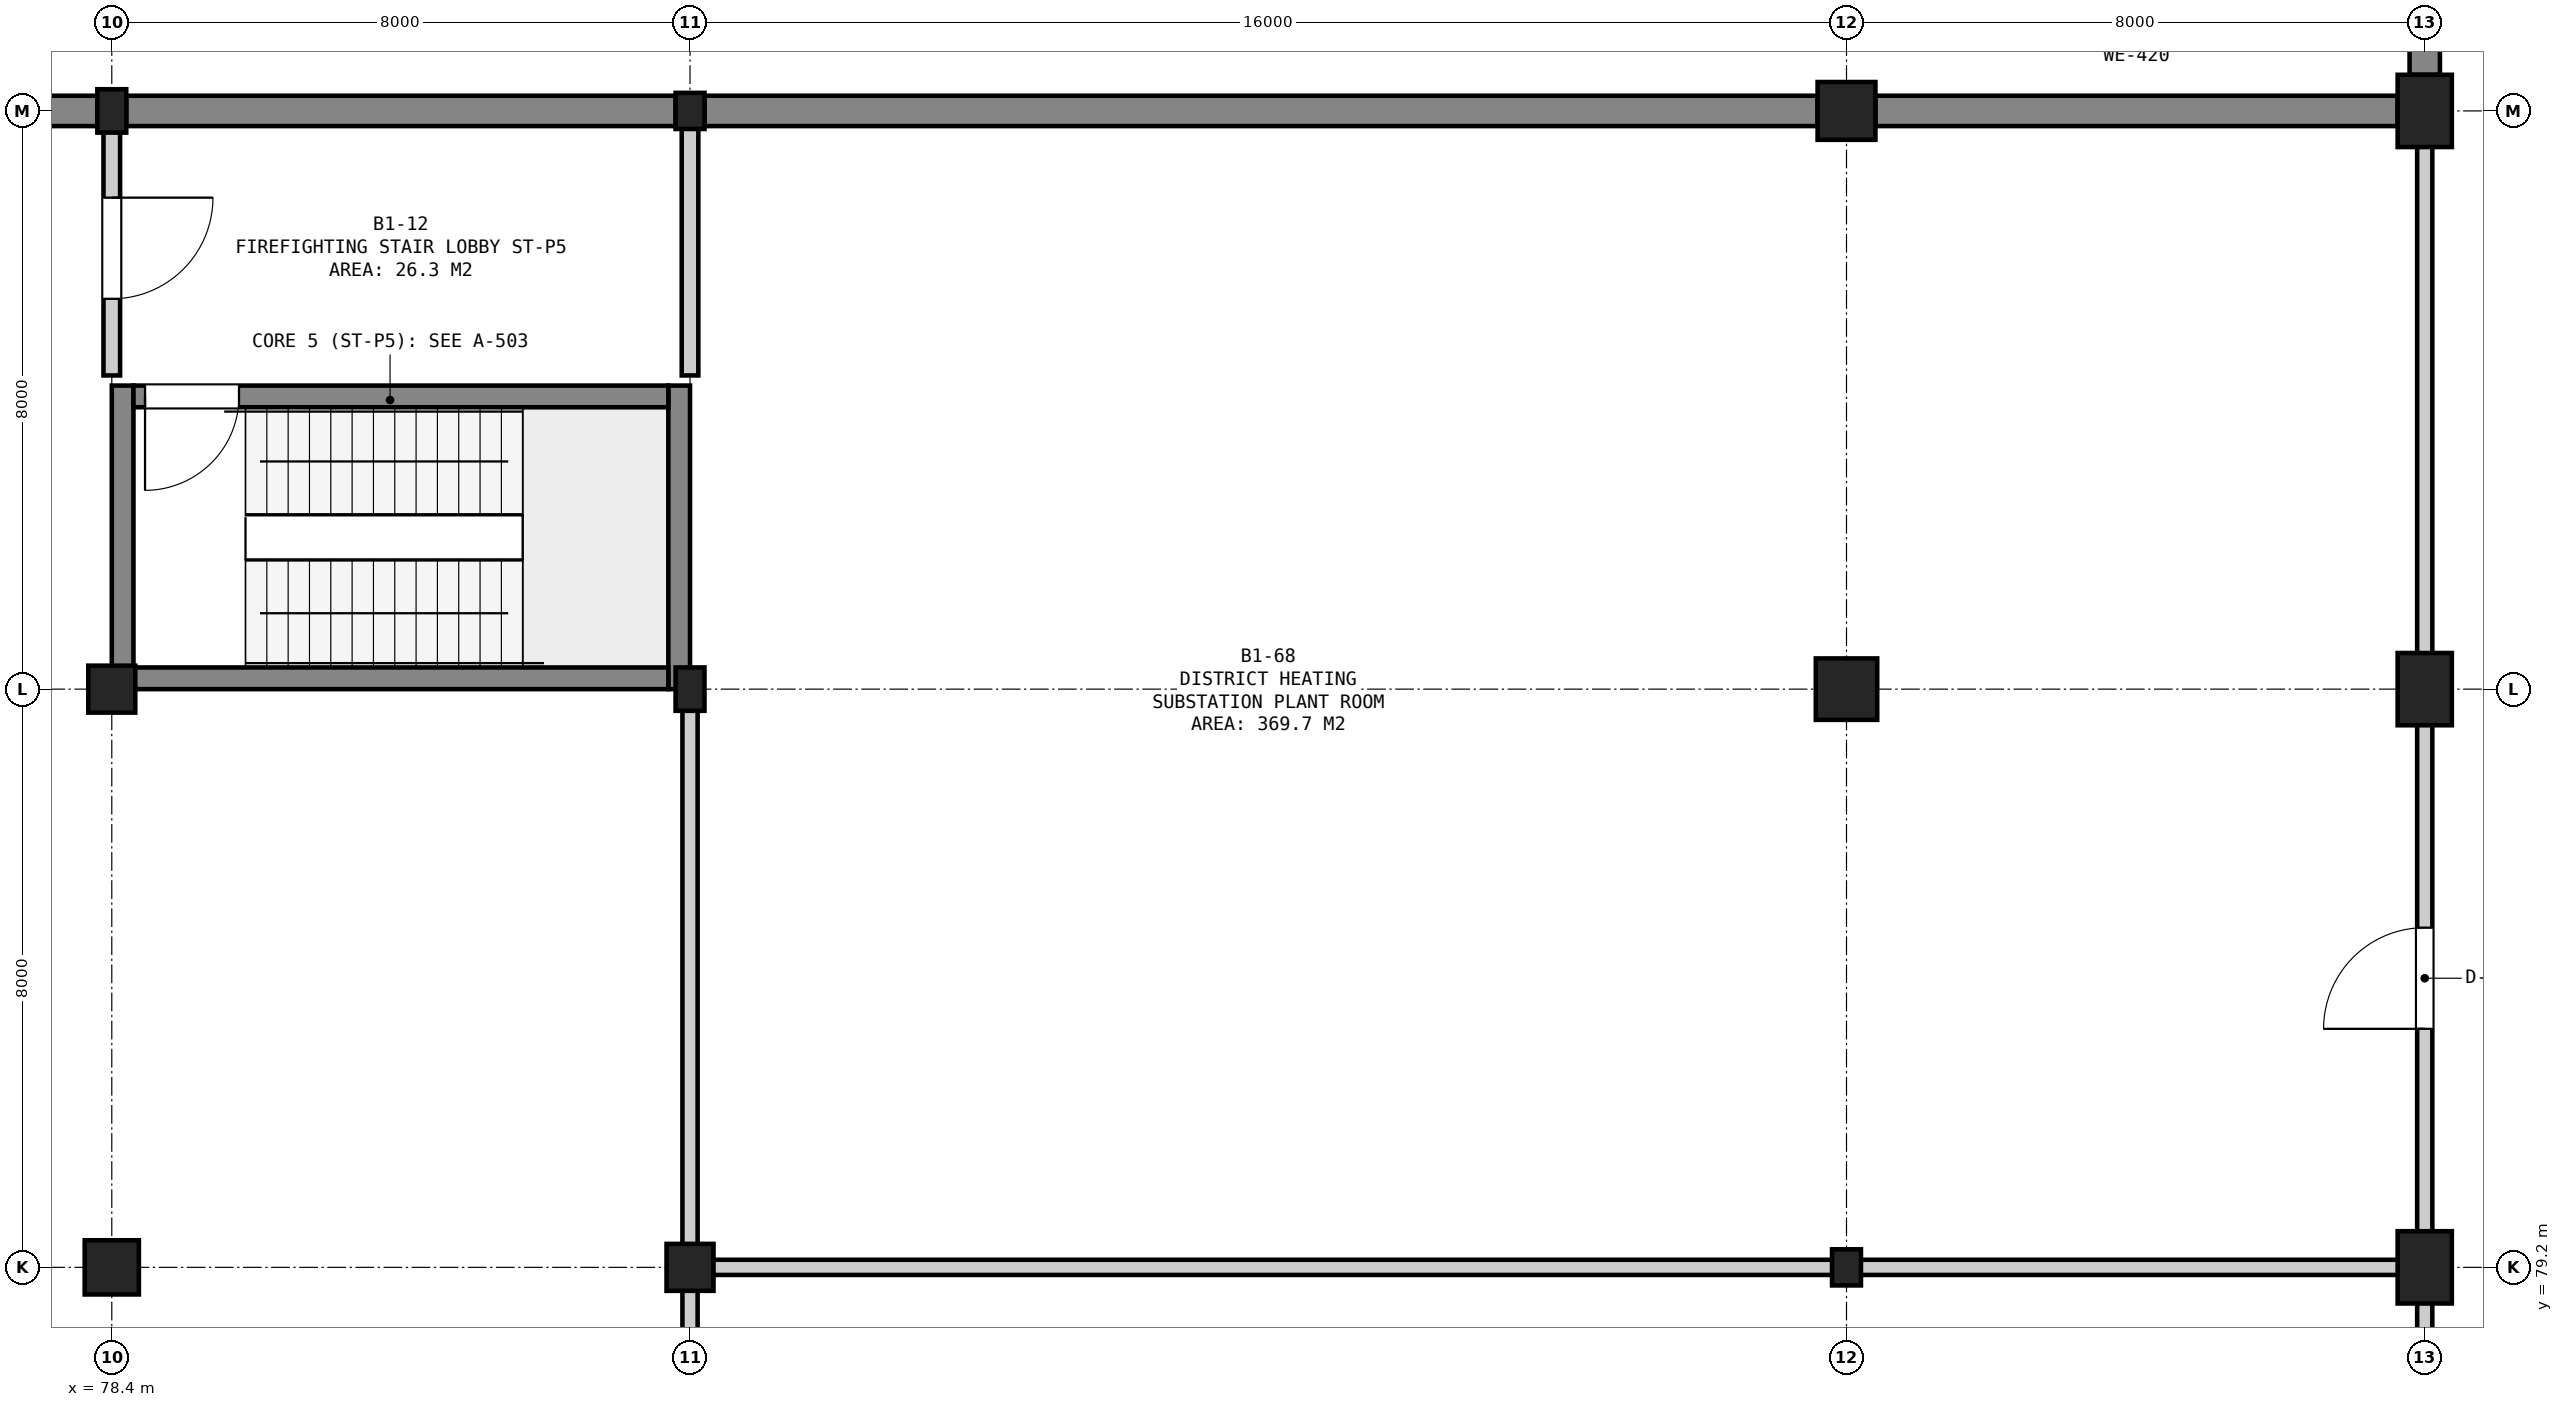
"""IFC4 building model, lengths in metres.
Left out: names, types, materials, properties, quantities, classifications, styles, units other than length and angle.
Written with IfcOpenShell. Run it as: python <this file> out.ifc"""

import sys

from ifc_helpers import new_model, si_unit, direction, frame, frame_2d, origin, origin_2d, place, context, subcontext, project, spatial, rectangle, extrude, element, fill, save


model = new_model("IFC4")
c1 = context("Model", 3, precision=1e-05, world=origin(), true_north=direction((0.0, 1.0)))
c2 = subcontext(c1, "Body", "Model", "MODEL_VIEW")
j1 = project(units=[si_unit("LENGTHUNIT", "METRE"), si_unit("PLANEANGLEUNIT", "RADIAN")], contexts=[c1])
p1 = place(None, origin())
s1 = spatial("IfcSite", under=j1, at=p1, CompositionType="ELEMENT")
p2 = place(p1, origin())
s2 = spatial("IfcBuilding", under=s1, at=p2, CompositionType="ELEMENT")
p3 = place(p2, frame((0.0, 0.0, -4.5)))
s3 = spatial("IfcBuildingStorey", under=s2, at=p3, CompositionType="ELEMENT", Elevation=-4.5)
p4 = place(p3, frame((78.4, 79.2, 0.0), z_axis=(0.0, 0.0, 1.0), x_axis=(1.0, 0.0, 0.0)))
e1 = element("IfcColumn", 1, at=p4, inside=s3, PredefinedType="COLUMN", context=c2, shape_type="SweptSolid", body=[
    extrude(rectangle(XDim=0.75, YDim=0.75, at=origin_2d()), origin(), (0.0, 0.0, 1.0), 4.5),
])
p5 = place(p3, frame((78.4, 87.2, 0.0), z_axis=(0.0, 0.0, 1.0), x_axis=(1.0, 0.0, 0.0)))
e2 = element("IfcColumn", 2, at=p5, inside=s3, PredefinedType="COLUMN", context=c2, shape_type="SweptSolid", body=[
    extrude(rectangle(XDim=0.65, YDim=0.65, at=origin_2d()), origin(), (0.0, 0.0, 1.0), 4.5),
])
p6 = place(p3, frame((78.4, 95.2, 0.0), z_axis=(0.0, 0.0, 1.0), x_axis=(1.0, 0.0, 0.0)))
e3 = element("IfcColumn", 3, at=p6, inside=s3, PredefinedType="COLUMN", context=c2, shape_type="SweptSolid", body=[
    extrude(rectangle(XDim=0.4, YDim=0.6, at=origin_2d()), origin(), (0.0, 0.0, 1.0), 4.5),
])
p7 = place(p3, frame((86.4, 79.2, 0.0), z_axis=(0.0, 0.0, 1.0), x_axis=(1.0, 0.0, 0.0)))
e4 = element("IfcColumn", 4, at=p7, inside=s3, PredefinedType="COLUMN", context=c2, shape_type="SweptSolid", body=[
    extrude(rectangle(XDim=0.65, YDim=0.65, at=origin_2d()), origin(), (0.0, 0.0, 1.0), 4.5),
])
p8 = place(p3, frame((86.4, 87.2, 0.0), z_axis=(0.0, 0.0, 1.0), x_axis=(1.0, 0.0, 0.0)))
e5 = element("IfcColumn", 5, at=p8, inside=s3, PredefinedType="COLUMN", context=c2, shape_type="SweptSolid", body=[
    extrude(rectangle(XDim=0.4, YDim=0.6, at=origin_2d()), origin(), (0.0, 0.0, 1.0), 4.5),
])
for number, where, z_axis, x_axis in (
    (6, (86.4, 95.2, 0.0), (0.0, 0.0, 1.0), (1.0, 0.0, 0.0)),
    (7, (102.4, 79.2, 0.0), (0.0, 0.0, 1.0), (1.0, 0.0, 0.0)),
):
    element("IfcColumn", number, at=place(p3, frame(where, z_axis=z_axis, x_axis=x_axis)), inside=s3, PredefinedType="COLUMN", context=c2, shape_type="SweptSolid", body=[
        extrude(rectangle(XDim=0.4, YDim=0.5, at=origin_2d()), origin(), (0.0, 0.0, 1.0), 4.5),
    ])
p9 = place(p3, frame((102.4, 87.2, 0.0), z_axis=(0.0, 0.0, 1.0), x_axis=(1.0, 0.0, 0.0)))
e8 = element("IfcColumn", 8, at=p9, inside=s3, PredefinedType="COLUMN", context=c2, shape_type="SweptSolid", body=[
    extrude(rectangle(XDim=0.85, YDim=0.85, at=origin_2d()), origin(), (0.0, 0.0, 1.0), 4.5),
])
p10 = place(p3, frame((102.4, 95.2, 0.0), z_axis=(0.0, 0.0, 1.0), x_axis=(1.0, 0.0, 0.0)))
e9 = element("IfcColumn", 9, at=p10, inside=s3, PredefinedType="COLUMN", context=c2, shape_type="SweptSolid", body=[
    extrude(rectangle(XDim=0.8, YDim=0.8, at=origin_2d()), origin(), (0.0, 0.0, 1.0), 4.5),
])
for number, where, z_axis, x_axis in (
    (10, (110.4, 79.2, 0.0), (0.0, 0.0, 1.0), (1.0, 0.0, 0.0)),
    (11, (110.4, 87.2, 0.0), (0.0, 0.0, 1.0), (1.0, 0.0, 0.0)),
    (12, (110.4, 95.2, 0.0), (0.0, 0.0, 1.0), (1.0, 0.0, 0.0)),
):
    element("IfcColumn", number, at=place(p3, frame(where, z_axis=z_axis, x_axis=x_axis)), inside=s3, PredefinedType="COLUMN", context=c2, shape_type="SweptSolid", body=[
        extrude(rectangle(XDim=0.75, YDim=1.0, at=origin_2d()), origin(), (0.0, 0.0, 1.0), 4.5),
    ])
p11 = place(p3, frame((110.4, 108.3, 0.0), z_axis=(0.0, 0.0, 1.0), x_axis=(0.0, -1.0, 0.0)))
e13 = element("IfcWall", 13, at=p11, inside=s3, PredefinedType="SOLIDWALL", context=c2, shape_type="SweptSolid", body=[
    extrude(rectangle(XDim=12.6, YDim=0.42, at=frame_2d((6.3, 0.0))), origin(), (0.0, 0.0, 1.0), 4.08),
])
p12 = place(p3, frame((110.025, 95.2, 0.0), z_axis=(0.0, 0.0, 1.0), x_axis=(-1.0, 0.0, 0.0)))
e14 = element("IfcWall", 14, at=p12, inside=s3, PredefinedType="SOLIDWALL", context=c2, shape_type="SweptSolid", body=[
    extrude(rectangle(XDim=7.225, YDim=0.42, at=frame_2d((3.612, 0.0))), origin(), (0.0, 0.0, 1.0), 4.08),
])
p13 = place(p3, frame((102.0, 95.2, 0.0), z_axis=(0.0, 0.0, 1.0), x_axis=(-1.0, 0.0, 0.0)))
e15 = element("IfcWall", 15, at=p13, inside=s3, PredefinedType="SOLIDWALL", context=c2, shape_type="SweptSolid", body=[
    extrude(rectangle(XDim=15.4, YDim=0.42, at=frame_2d((7.7, 0.0))), origin(), (0.0, 0.0, 1.0), 4.08),
])
p14 = place(p3, frame((86.2, 95.2, 0.0), z_axis=(0.0, 0.0, 1.0), x_axis=(-1.0, 0.0, 0.0)))
e16 = element("IfcWall", 16, at=p14, inside=s3, PredefinedType="SOLIDWALL", context=c2, shape_type="SweptSolid", body=[
    extrude(rectangle(XDim=7.6, YDim=0.42, at=frame_2d((3.8, 0.0))), origin(), (0.0, 0.0, 1.0), 4.08),
])
p15 = place(p3, frame((78.2, 95.2, 0.0), z_axis=(0.0, 0.0, 1.0), x_axis=(-1.0, 0.0, 0.0)))
e17 = element("IfcWall", 17, at=p15, inside=s3, PredefinedType="SOLIDWALL", context=c2, shape_type="SweptSolid", body=[
    extrude(rectangle(XDim=15.425, YDim=0.42, at=frame_2d((7.712, 0.0))), origin(), (0.0, 0.0, 1.0), 4.08),
])
for number, where, z_axis, x_axis in (
    (18, (78.55, 87.2, 0.0), (0.0, 0.0, 1.0), (0.0, 1.0, 0.0)),
    (19, (86.25, 87.2, 0.0), (0.0, 0.0, 1.0), (0.0, 1.0, 0.0)),
):
    element("IfcWall", number, at=place(p3, frame(where, z_axis=z_axis, x_axis=x_axis)), inside=s3, PredefinedType="SHEAR", context=c2, shape_type="SweptSolid", body=[
        extrude(rectangle(XDim=4.2, YDim=0.3, at=frame_2d((2.1, 0.0))), origin(), (0.0, 0.0, 1.0), 4.08),
    ])
p16 = place(p3, frame((78.7, 87.35, 0.0), z_axis=(0.0, 0.0, 1.0), x_axis=(1.0, 0.0, 0.0)))
e20 = element("IfcWall", 20, at=p16, inside=s3, PredefinedType="SHEAR", context=c2, shape_type="SweptSolid", body=[
    extrude(rectangle(XDim=7.4, YDim=0.3, at=frame_2d((3.7, 0.0))), origin(), (0.0, 0.0, 1.0), 4.08),
])
p17 = place(p3, frame((78.7, 91.25, 0.0), z_axis=(0.0, 0.0, 1.0), x_axis=(1.0, 0.0, 0.0)))
e21 = element("IfcWall", 21, at=p17, inside=s3, PredefinedType="SHEAR", context=c2, shape_type="SweptSolid", body=[
    extrude(rectangle(XDim=7.4, YDim=0.3, at=frame_2d((3.7, 0.0))), origin(), (0.0, 0.0, 1.0), 4.08),
])
p18 = place(p17, frame((0.16, 0.0, 0.0)))
e22 = element("IfcOpeningElement", 22, at=p18, cuts=e21, PredefinedType="OPENING", context=c2, shape_type="SweptSolid", body=[
    extrude(rectangle(XDim=1.3, YDim=2.18, at=frame_2d((0.65, 1.09))), frame((0.0, 0.162, 0.0), z_axis=(0.0, -1.0, 0.0), x_axis=(1.0, 0.0, 0.0)), (0.0, 0.0, 1.0), 0.324),
])
p19 = place(p3, frame((78.4, 91.54, 0.0), z_axis=(0.0, 0.0, 1.0), x_axis=(0.0, 1.0, 0.0)))
e23 = element("IfcWall", 23, at=p19, inside=s3, PredefinedType="SOLIDWALL", context=c2, shape_type="SweptSolid", body=[
    extrude(rectangle(XDim=3.435, YDim=0.23, at=frame_2d((1.718, 0.0))), origin(), (0.0, 0.0, 1.0), 3.625),
])
p20 = place(p19, frame((1.06, 0.0, 0.0)))
e24 = element("IfcOpeningElement", 24, at=p20, cuts=e23, PredefinedType="OPENING", context=c2, shape_type="SweptSolid", body=[
    extrude(rectangle(XDim=1.4, YDim=2.2, at=frame_2d((0.7, 1.1))), frame((0.0, 0.127, 0.0), z_axis=(0.0, -1.0, 0.0), x_axis=(1.0, 0.0, 0.0)), (0.0, 0.0, 1.0), 0.254),
])
p21 = place(p3, frame((86.4, 91.54, 0.0), z_axis=(0.0, 0.0, 1.0), x_axis=(0.0, 1.0, 0.0)))
e25 = element("IfcWall", 25, at=p21, inside=s3, PredefinedType="SOLIDWALL", context=c2, shape_type="SweptSolid", body=[
    extrude(rectangle(XDim=3.435, YDim=0.23, at=frame_2d((1.718, 0.0))), origin(), (0.0, 0.0, 1.0), 3.525),
])
p22 = place(p3, frame((86.54, 79.2, 0.0), z_axis=(0.0, 0.0, 1.0), x_axis=(1.0, 0.0, 0.0)))
e26 = element("IfcWall", 26, at=p22, inside=s3, PredefinedType="SOLIDWALL", context=c2, shape_type="SweptSolid", body=[
    extrude(rectangle(XDim=23.72, YDim=0.21, at=frame_2d((11.86, 0.0))), origin(), (0.0, 0.0, 1.0), 2.925),
])
p23 = place(p3, frame((86.4, 65.6, 0.0), z_axis=(0.0, 0.0, 1.0), x_axis=(0.0, 1.0, 0.0)))
e27 = element("IfcWall", 27, at=p23, inside=s3, PredefinedType="SOLIDWALL", context=c2, shape_type="SweptSolid", body=[
    extrude(rectangle(XDim=13.46, YDim=0.21, at=frame_2d((6.73, 0.0))), origin(), (0.0, 0.0, 1.0), 3.275),
])
p24 = place(p3, frame((110.4, 59.34, 0.0), z_axis=(0.0, 0.0, 1.0), x_axis=(0.0, 1.0, 0.0)))
e28 = element("IfcWall", 28, at=p24, inside=s3, PredefinedType="SOLIDWALL", context=c2, shape_type="SweptSolid", body=[
    extrude(rectangle(XDim=19.72, YDim=0.21, at=frame_2d((9.86, 0.0))), origin(), (0.0, 0.0, 1.0), 3.475),
])
p25 = place(p3, frame((86.4, 79.34, 0.0), z_axis=(0.0, 0.0, 1.0), x_axis=(0.0, 1.0, 0.0)))
e29 = element("IfcWall", 29, at=p25, inside=s3, PredefinedType="SOLIDWALL", context=c2, shape_type="SweptSolid", body=[
    extrude(rectangle(XDim=7.72, YDim=0.21, at=frame_2d((3.86, 0.0))), origin(), (0.0, 0.0, 1.0), 3.475),
])
p26 = place(p3, frame((110.4, 79.34, 0.0), z_axis=(0.0, 0.0, 1.0), x_axis=(0.0, 1.0, 0.0)))
e30 = element("IfcWall", 30, at=p26, inside=s3, PredefinedType="SOLIDWALL", context=c2, shape_type="SweptSolid", body=[
    extrude(rectangle(XDim=15.755, YDim=0.21, at=frame_2d((7.877, 0.0))), origin(), (0.0, 0.0, 1.0), 3.225),
])
p27 = place(p26, frame((3.16, 0.0, 0.0)))
e31 = element("IfcOpeningElement", 31, at=p27, cuts=e30, PredefinedType="OPENING", context=c2, shape_type="SweptSolid", body=[
    extrude(rectangle(XDim=1.4, YDim=2.2, at=frame_2d((0.7, 1.1))), frame((0.0, 0.117, 0.0), z_axis=(0.0, -1.0, 0.0), x_axis=(1.0, 0.0, 0.0)), (0.0, 0.0, 1.0), 0.234),
])
p28 = place(p18, frame((1.3, 0.0, 0.0), z_axis=(0.0, 0.0, 1.0), x_axis=(-1.0, 0.0, 0.0)))
e32 = element("IfcDoor", 32, at=p28, inside=s3, OperationType="SINGLE_SWING_RIGHT", PredefinedType="DOOR", context=c2, shape_type="SweptSolid", body=[
    extrude(rectangle(XDim=1.3, YDim=2.18, at=frame_2d((0.65, 1.09))), frame((0.0, 0.025, 0.0), z_axis=(0.0, -1.0, 0.0), x_axis=(1.0, 0.0, 0.0)), (0.0, 0.0, 1.0), 0.05),
])
fill(e22, e32)
p29 = place(p20, frame((1.4, 0.0, 0.0), z_axis=(0.0, 0.0, 1.0), x_axis=(-1.0, 0.0, 0.0)))
e33 = element("IfcDoor", 33, at=p29, inside=s3, OperationType="SINGLE_SWING_LEFT", PredefinedType="DOOR", context=c2, shape_type="SweptSolid", body=[
    extrude(rectangle(XDim=1.4, YDim=2.2, at=frame_2d((0.7, 1.1))), frame((0.0, 0.025, 0.0), z_axis=(0.0, -1.0, 0.0), x_axis=(1.0, 0.0, 0.0)), (0.0, 0.0, 1.0), 0.05),
])
fill(e24, e33)
p30 = place(p27, origin())
e34 = element("IfcDoor", 34, at=p30, inside=s3, OperationType="SINGLE_SWING_LEFT", PredefinedType="DOOR", context=c2, shape_type="SweptSolid", body=[
    extrude(rectangle(XDim=1.4, YDim=2.2, at=frame_2d((0.7, 1.1))), frame((0.0, 0.025, 0.0), z_axis=(0.0, -1.0, 0.0), x_axis=(1.0, 0.0, 0.0)), (0.0, 0.0, 1.0), 0.05),
])
fill(e31, e34)
save(model, sys.argv[1])
